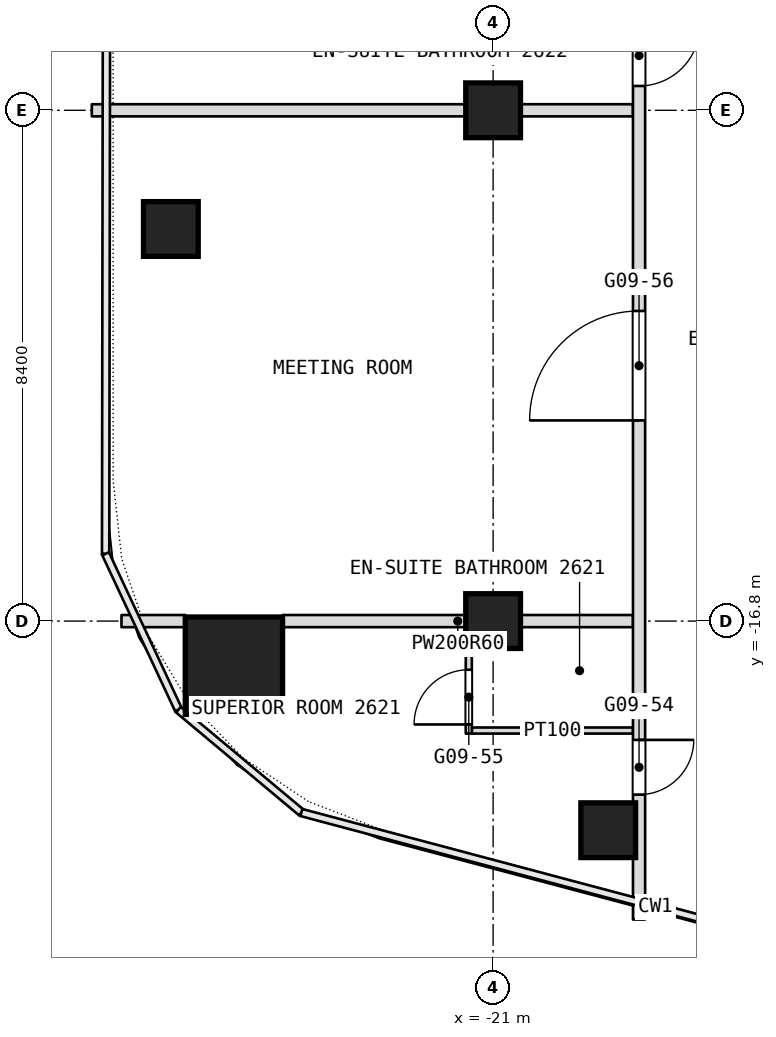
"""IFC4 building model, lengths in metres.
Left out: names, types, materials, properties, quantities, classifications, styles, units other than length and angle.
Written with IfcOpenShell. Run it as: python <this file> out.ifc"""

import sys

from ifc_helpers import new_model, si_unit, direction, frame, frame_2d, origin, origin_2d, place, context, subcontext, project, spatial, rectangle, extrude, element, fill, save


model = new_model("IFC4")
c1 = context("Model", 3, precision=1e-05, world=origin(), true_north=direction((0.0, 1.0)))
c2 = subcontext(c1, "Body", "Model", "MODEL_VIEW")
j1 = project(units=[si_unit("LENGTHUNIT", "METRE"), si_unit("PLANEANGLEUNIT", "RADIAN")], contexts=[c1])
p1 = place(None, origin())
s1 = spatial("IfcSite", under=j1, at=p1, CompositionType="ELEMENT")
p2 = place(p1, origin())
s2 = spatial("IfcBuilding", under=s1, at=p2, CompositionType="ELEMENT")
p3 = place(p2, frame((0.0, 0.0, 119.3)))
s3 = spatial("IfcBuildingStorey", under=s2, at=p3, CompositionType="ELEMENT", Elevation=119.3)
p4 = place(p3, frame((-25.263, -17.533, 0.0), z_axis=(0.0, 0.0, 1.0), x_axis=(1.0, 0.0, 0.0)))
e1 = element("IfcColumn", 1, at=p4, inside=s3, PredefinedType="COLUMN", context=c2, shape_type="SweptSolid", body=[
    extrude(rectangle(XDim=1.6, YDim=1.6, at=origin_2d()), origin(), (0.0, 0.0, 1.0), 3.6),
])
for number, where, z_axis, x_axis in (
    (2, (-21.0, -16.8, 0.0), (0.0, 0.0, 1.0), (1.0, 0.0, 0.0)),
    (3, (-21.0, -8.4, 0.0), (0.0, 0.0, 1.0), (1.0, 0.0, 0.0)),
    (4, (-26.3, -10.352, 0.0), (0.0, 0.0, 1.0), (1.0, 0.0, 0.0)),
    (5, (-19.107, -20.239, 0.0), (0.0, 0.0, 1.0), (1.0, 0.0, 0.0)),
):
    element("IfcColumn", number, at=place(p3, frame(where, z_axis=z_axis, x_axis=x_axis)), inside=s3, PredefinedType="COLUMN", context=c2, shape_type="SweptSolid", body=[
        extrude(rectangle(XDim=0.9, YDim=0.9, at=origin_2d()), origin(), (0.0, 0.0, 1.0), 3.6),
    ])
p5 = place(p3, frame((-21.35, -18.6, 0.0), z_axis=(0.0, 0.0, 1.0), x_axis=(1.0, 0.0, 0.0)))
e6 = element("IfcWall", 6, at=p5, inside=s3, PredefinedType="PARTITIONING", context=c2, shape_type="SweptSolid", body=[
    extrude(rectangle(XDim=2.65, YDim=0.1, at=frame_2d((1.325, 0.0))), origin(), (0.0, 0.0, 1.0), 3.34),
])
p6 = place(p3, frame((-27.112, -16.8, 0.0), z_axis=(0.0, 0.0, 1.0), x_axis=(1.0, 0.0, 0.0)))
e7 = element("IfcWall", 7, at=p6, inside=s3, PredefinedType="PARTITIONING", context=c2, shape_type="SweptSolid", body=[
    extrude(rectangle(XDim=1.049, YDim=0.2, at=frame_2d((0.524, 0.0))), origin(), (0.0, 0.0, 1.0), 3.34),
])
p7 = place(p3, frame((-24.463, -16.8, 0.0), z_axis=(0.0, 0.0, 1.0), x_axis=(1.0, 0.0, 0.0)))
e8 = element("IfcWall", 8, at=p7, inside=s3, PredefinedType="PARTITIONING", context=c2, shape_type="SweptSolid", body=[
    extrude(rectangle(XDim=5.763, YDim=0.2, at=frame_2d((2.881, 0.0))), origin(), (0.0, 0.0, 1.0), 2.89),
])
p8 = place(p3, frame((-27.6, -8.4, 0.0), z_axis=(0.0, 0.0, 1.0), x_axis=(1.0, 0.0, 0.0)))
e9 = element("IfcWall", 9, at=p8, inside=s3, PredefinedType="PARTITIONING", context=c2, shape_type="SweptSolid", body=[
    extrude(rectangle(XDim=8.9, YDim=0.2, at=frame_2d((4.45, 0.0))), origin(), (0.0, 0.0, 1.0), 2.89),
])
p9 = place(p3, frame((-18.6, -21.708, 0.0), z_axis=(0.0, 0.0, 1.0), x_axis=(0.0, 1.0, 0.0)))
e10 = element("IfcWall", 10, at=p9, inside=s3, PredefinedType="PARTITIONING", context=c2, shape_type="SweptSolid", body=[
    extrude(rectangle(XDim=28.608, YDim=0.2, at=frame_2d((14.304, 0.0))), origin(), (0.0, 0.0, 1.0), 3.34),
])
p10 = place(p9, frame((2.054, 0.0, 0.0)))
e11 = element("IfcOpeningElement", 11, at=p10, cuts=e10, PredefinedType="OPENING", context=c2, shape_type="SweptSolid", body=[
    extrude(rectangle(XDim=0.9, YDim=2.1, at=frame_2d((0.45, 1.05))), frame((0.0, 0.1, 0.0), z_axis=(0.0, -1.0, 0.0), x_axis=(1.0, 0.0, 0.0)), (0.0, 0.0, 1.0), 0.2),
])
p11 = place(p9, frame((8.208, 0.0, 0.0)))
e12 = element("IfcOpeningElement", 12, at=p11, cuts=e10, PredefinedType="OPENING", context=c2, shape_type="SweptSolid", body=[
    extrude(rectangle(XDim=1.8, YDim=2.1, at=frame_2d((0.9, 1.05))), frame((0.0, 0.1, 0.0), z_axis=(0.0, -1.0, 0.0), x_axis=(1.0, 0.0, 0.0)), (0.0, 0.0, 1.0), 0.2),
])
p12 = place(p9, frame((13.708, 0.0, 0.0)))
e13 = element("IfcOpeningElement", 13, at=p12, cuts=e10, PredefinedType="OPENING", context=c2, shape_type="SweptSolid", body=[
    extrude(rectangle(XDim=1.0, YDim=2.1, at=frame_2d((0.5, 1.05))), frame((0.0, 0.1, 0.0), z_axis=(0.0, -1.0, 0.0), x_axis=(1.0, 0.0, 0.0)), (0.0, 0.0, 1.0), 0.2),
])
p13 = place(p9, frame((20.308, 0.0, 0.0)))
e14 = element("IfcOpeningElement", 14, at=p13, cuts=e10, PredefinedType="OPENING", context=c2, shape_type="SweptSolid", body=[
    extrude(rectangle(XDim=1.0, YDim=2.1, at=frame_2d((0.5, 1.05))), frame((0.0, 0.1, 0.0), z_axis=(0.0, -1.0, 0.0), x_axis=(1.0, 0.0, 0.0)), (0.0, 0.0, 1.0), 0.2),
])
p14 = place(p9, frame((24.508, 0.0, 0.0)))
e15 = element("IfcOpeningElement", 15, at=p14, cuts=e10, PredefinedType="OPENING", context=c2, shape_type="SweptSolid", body=[
    extrude(rectangle(XDim=1.0, YDim=2.1, at=frame_2d((0.5, 1.05))), frame((0.0, 0.1, 0.0), z_axis=(0.0, -1.0, 0.0), x_axis=(1.0, 0.0, 0.0)), (0.0, 0.0, 1.0), 0.2),
])
p15 = place(p3, frame((-21.4, -18.65, 0.0), z_axis=(0.0, 0.0, 1.0), x_axis=(0.0, 1.0, 0.0)))
e16 = element("IfcWall", 16, at=p15, inside=s3, PredefinedType="PARTITIONING", context=c2, shape_type="SweptSolid", body=[
    extrude(rectangle(XDim=1.95, YDim=0.1, at=frame_2d((0.975, 0.0))), origin(), (0.0, 0.0, 1.0), 3.34),
])
p16 = place(p15, frame((0.15, 0.0, 0.0)))
e17 = element("IfcOpeningElement", 17, at=p16, cuts=e16, PredefinedType="OPENING", context=c2, shape_type="SweptSolid", body=[
    extrude(rectangle(XDim=0.9, YDim=2.1, at=frame_2d((0.45, 1.05))), frame((0.0, 0.05, 0.0), z_axis=(0.0, -1.0, 0.0), x_axis=(1.0, 0.0, 0.0)), (0.0, 0.0, 1.0), 0.1),
])
p17 = place(p10, origin())
e18 = element("IfcDoor", 18, at=p17, inside=s3, OperationType="SINGLE_SWING_LEFT", PredefinedType="DOOR", context=c2, shape_type="SweptSolid", body=[
    extrude(rectangle(XDim=0.9, YDim=2.1, at=frame_2d((0.45, 1.05))), frame((0.0, 0.025, 0.0), z_axis=(0.0, -1.0, 0.0), x_axis=(1.0, 0.0, 0.0)), (0.0, 0.0, 1.0), 0.05),
])
fill(e11, e18)
p18 = place(p11, origin())
e19 = element("IfcDoor", 19, at=p18, inside=s3, OperationType="DOUBLE_DOOR_SINGLE_SWING", PredefinedType="DOOR", context=c2, shape_type="SweptSolid", body=[
    extrude(rectangle(XDim=1.8, YDim=2.1, at=frame_2d((0.9, 1.05))), frame((0.0, 0.025, 0.0), z_axis=(0.0, -1.0, 0.0), x_axis=(1.0, 0.0, 0.0)), (0.0, 0.0, 1.0), 0.05),
])
fill(e12, e19)
p19 = place(p12, origin())
e20 = element("IfcDoor", 20, at=p19, inside=s3, OperationType="SINGLE_SWING_RIGHT", PredefinedType="DOOR", context=c2, shape_type="SweptSolid", body=[
    extrude(rectangle(XDim=1.0, YDim=2.1, at=frame_2d((0.5, 1.05))), frame((0.0, 0.025, 0.0), z_axis=(0.0, -1.0, 0.0), x_axis=(1.0, 0.0, 0.0)), (0.0, 0.0, 1.0), 0.05),
])
fill(e13, e20)
p20 = place(p16, origin())
e21 = element("IfcDoor", 21, at=p20, inside=s3, OperationType="SINGLE_SWING_RIGHT", PredefinedType="DOOR", context=c2, shape_type="SweptSolid", body=[
    extrude(rectangle(XDim=0.9, YDim=2.1, at=frame_2d((0.45, 1.05))), frame((0.0, 0.025, 0.0), z_axis=(0.0, -1.0, 0.0), x_axis=(1.0, 0.0, 0.0)), (0.0, 0.0, 1.0), 0.05),
])
fill(e17, e21)
save(model, sys.argv[1])
